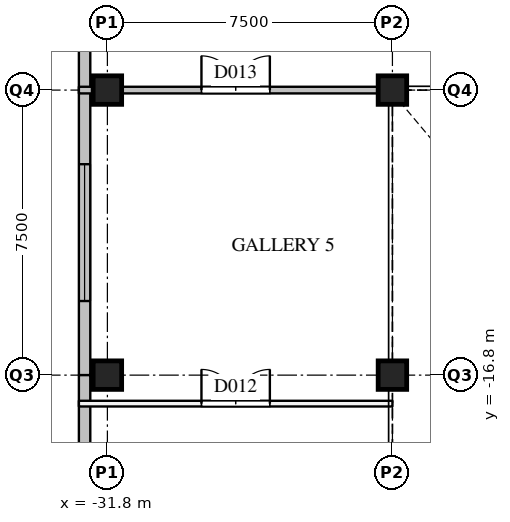
"""IFC4 building model, lengths in metres.
Left out: names, types, materials, properties, quantities, classifications, styles, units other than length and angle.
Written with IfcOpenShell. Run it as: python <this file> out.ifc"""

import sys

from ifc_helpers import new_model, si_unit, direction, frame, frame_2d, origin, origin_2d, place, context, subcontext, project, spatial, rectangle, extrude, element, fill, save


model = new_model("IFC4")
c1 = context("Model", 3, precision=1e-05, world=origin(), true_north=direction((0.0, 1.0)))
c2 = subcontext(c1, "Body", "Model", "MODEL_VIEW")
j1 = project(units=[si_unit("LENGTHUNIT", "METRE"), si_unit("PLANEANGLEUNIT", "RADIAN")], contexts=[c1])
p1 = place(None, origin())
s1 = spatial("IfcSite", under=j1, at=p1, CompositionType="ELEMENT")
p2 = place(p1, origin())
s2 = spatial("IfcBuilding", under=s1, at=p2, CompositionType="ELEMENT")
p3 = place(p2, frame((0.0, 0.0, 14.0)))
s3 = spatial("IfcBuildingStorey", under=s2, at=p3, CompositionType="ELEMENT", Elevation=14.0)
for number, where, z_axis, x_axis in (
    (1, (-31.8, -16.8, 0.0), (0.0, 0.0, 1.0), (1.0, 0.0, 0.0)),
    (2, (-31.8, -9.3, 0.0), (0.0, 0.0, 1.0), (1.0, 0.0, 0.0)),
    (3, (-24.3, -16.8, 0.0), (0.0, 0.0, 1.0), (1.0, 0.0, 0.0)),
    (4, (-24.3, -9.3, 0.0), (0.0, 0.0, 1.0), (1.0, 0.0, 0.0)),
):
    element("IfcColumn", number, at=place(p3, frame(where, z_axis=z_axis, x_axis=x_axis)), inside=s3, PredefinedType="COLUMN", context=c2, shape_type="SweptSolid", body=[
        extrude(rectangle(XDim=0.75, YDim=0.75, at=origin_2d()), origin(), (0.0, 0.0, 1.0), 7.0),
    ])
p4 = place(p3, frame((-32.4, -1.8, 0.0), z_axis=(0.0, 0.0, 1.0), x_axis=(0.0, -1.0, 0.0)))
e5 = element("IfcWall", 5, at=p4, inside=s3, PredefinedType="SOLIDWALL", context=c2, shape_type="SweptSolid", body=[
    extrude(rectangle(XDim=7.5, YDim=0.3, at=frame_2d((3.75, 0.0))), origin(), (0.0, 0.0, 1.0), 6.59),
])
p5 = place(p4, frame((1.95, 0.0, 0.9)))
e6 = element("IfcOpeningElement", 6, at=p5, cuts=e5, PredefinedType="OPENING", context=c2, shape_type="SweptSolid", body=[
    extrude(rectangle(XDim=3.6, YDim=3.0, at=frame_2d((1.8, 1.5))), frame((0.0, 0.16, 0.0), z_axis=(0.0, -1.0, 0.0), x_axis=(1.0, 0.0, 0.0)), (0.0, 0.0, 1.0), 0.32),
])
p6 = place(p3, frame((-32.4, -9.3, 0.0), z_axis=(0.0, 0.0, 1.0), x_axis=(0.0, -1.0, 0.0)))
e7 = element("IfcWall", 7, at=p6, inside=s3, PredefinedType="SOLIDWALL", context=c2, shape_type="SweptSolid", body=[
    extrude(rectangle(XDim=7.5, YDim=0.3, at=frame_2d((3.75, 0.0))), origin(), (0.0, 0.0, 1.0), 6.59),
])
p7 = place(p6, frame((1.95, 0.0, 0.9)))
e8 = element("IfcOpeningElement", 8, at=p7, cuts=e7, PredefinedType="OPENING", context=c2, shape_type="SweptSolid", body=[
    extrude(rectangle(XDim=3.6, YDim=3.0, at=frame_2d((1.8, 1.5))), frame((0.0, 0.16, 0.0), z_axis=(0.0, -1.0, 0.0), x_axis=(1.0, 0.0, 0.0)), (0.0, 0.0, 1.0), 0.32),
])
p8 = place(p3, frame((-32.4, -16.8, 0.0), z_axis=(0.0, 0.0, 1.0), x_axis=(0.0, -1.0, 0.0)))
e9 = element("IfcWall", 9, at=p8, inside=s3, PredefinedType="SOLIDWALL", context=c2, shape_type="SweptSolid", body=[
    extrude(rectangle(XDim=4.15, YDim=0.3, at=frame_2d((2.075, 0.0))), origin(), (0.0, 0.0, 1.0), 6.59),
])
p9 = place(p3, frame((-32.55, -9.3, 0.0), z_axis=(0.0, 0.0, 1.0), x_axis=(1.0, 0.0, 0.0)))
e10 = element("IfcWall", 10, at=p9, inside=s3, PredefinedType="PARTITIONING", context=c2, shape_type="SweptSolid", body=[
    extrude(rectangle(XDim=8.25, YDim=0.175, at=frame_2d((4.125, 0.0))), origin(), (0.0, 0.0, 1.0), 5.79),
])
p10 = place(p9, frame((3.225, 0.0, 0.0)))
e11 = element("IfcOpeningElement", 11, at=p10, cuts=e10, PredefinedType="OPENING", context=c2, shape_type="SweptSolid", body=[
    extrude(rectangle(XDim=1.8, YDim=2.1, at=frame_2d((0.9, 1.05))), frame((0.0, 0.097, 0.0), z_axis=(0.0, -1.0, 0.0), x_axis=(1.0, 0.0, 0.0)), (0.0, 0.0, 1.0), 0.195),
])
p11 = place(p3, frame((-32.55, -17.55, 0.0), z_axis=(0.0, 0.0, 1.0), x_axis=(1.0, 0.0, 0.0)))
e12 = element("IfcWall", 12, at=p11, inside=s3, PredefinedType="PARTITIONING", context=c2, shape_type="SweptSolid", body=[
    extrude(rectangle(XDim=8.25, YDim=0.15, at=frame_2d((4.125, 0.0))), origin(), (0.0, 0.0, 1.0), 5.79),
])
p12 = place(p11, frame((3.225, 0.0, 0.0)))
e13 = element("IfcOpeningElement", 13, at=p12, cuts=e12, PredefinedType="OPENING", context=c2, shape_type="SweptSolid", body=[
    extrude(rectangle(XDim=1.8, YDim=2.1, at=frame_2d((0.9, 1.05))), frame((0.0, 0.085, 0.0), z_axis=(0.0, -1.0, 0.0), x_axis=(1.0, 0.0, 0.0)), (0.0, 0.0, 1.0), 0.17),
])
p13 = place(p7, origin())
e14 = element("IfcWindow", 14, at=p13, inside=s3, PartitioningType="SINGLE_PANEL", PredefinedType="WINDOW", context=c2, shape_type="SweptSolid", body=[
    extrude(rectangle(XDim=3.6, YDim=3.0, at=frame_2d((1.8, 1.5))), frame((0.0, 0.03, 0.0), z_axis=(0.0, -1.0, 0.0), x_axis=(1.0, 0.0, 0.0)), (0.0, 0.0, 1.0), 0.06),
])
fill(e8, e14)
p14 = place(p12, origin())
e15 = element("IfcDoor", 15, at=p14, inside=s3, OperationType="DOUBLE_DOOR_SINGLE_SWING", PredefinedType="DOOR", context=c2, shape_type="SweptSolid", body=[
    extrude(rectangle(XDim=1.8, YDim=2.1, at=frame_2d((0.9, 1.05))), frame((0.0, 0.025, 0.0), z_axis=(0.0, -1.0, 0.0), x_axis=(1.0, 0.0, 0.0)), (0.0, 0.0, 1.0), 0.05),
])
fill(e13, e15)
p15 = place(p10, origin())
e16 = element("IfcDoor", 16, at=p15, inside=s3, OperationType="DOUBLE_DOOR_SINGLE_SWING", PredefinedType="DOOR", context=c2, shape_type="SweptSolid", body=[
    extrude(rectangle(XDim=1.8, YDim=2.1, at=frame_2d((0.9, 1.05))), frame((0.0, 0.025, 0.0), z_axis=(0.0, -1.0, 0.0), x_axis=(1.0, 0.0, 0.0)), (0.0, 0.0, 1.0), 0.05),
])
fill(e11, e16)
save(model, sys.argv[1])
